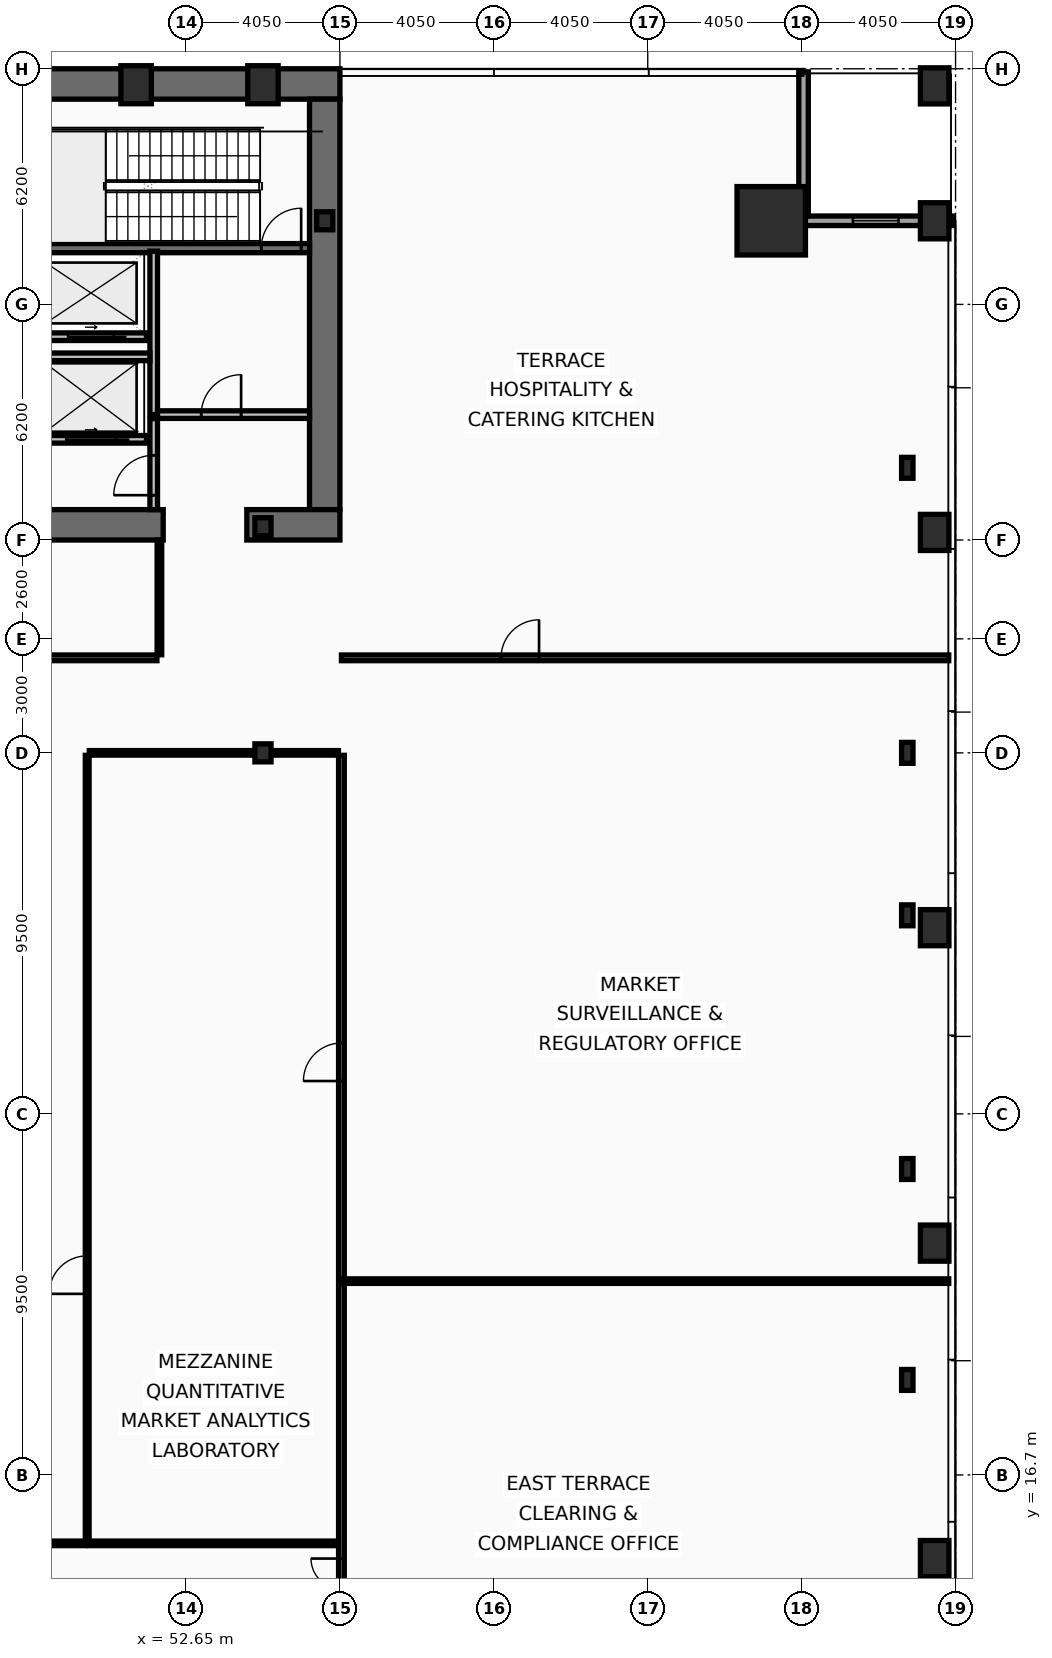
"""IFC4 building model, lengths in metres.
Left out: names, types, materials, properties, quantities, classifications, styles, units other than length and angle.
Written with IfcOpenShell. Run it as: python <this file> out.ifc"""

import sys

from ifc_helpers import new_model, si_unit, direction, frame, frame_2d, origin, origin_2d, place, context, subcontext, project, spatial, rectangle, hollow_rectangle, i_section, extrude, element, fill, save


model = new_model("IFC4")
c1 = context("Model", 3, precision=1e-05, world=origin(), true_north=direction((0.0, 1.0)))
c2 = subcontext(c1, "Body", "Model", "MODEL_VIEW")
j1 = project(units=[si_unit("LENGTHUNIT", "METRE"), si_unit("PLANEANGLEUNIT", "RADIAN")], contexts=[c1])
p1 = place(None, origin())
s1 = spatial("IfcSite", under=j1, at=p1, CompositionType="ELEMENT")
p2 = place(p1, origin())
s2 = spatial("IfcBuilding", under=s1, at=p2, CompositionType="ELEMENT")
p3 = place(p2, frame((0.0, 0.0, 15.4)))
s3 = spatial("IfcBuildingStorey", under=s2, at=p3, CompositionType="ELEMENT", Elevation=15.4)
p4 = place(p3, frame((16.2, 53.3, 0.0), z_axis=(0.0, 0.0, 1.0), x_axis=(1.0, 0.0, 0.0)))
e1 = element("IfcWall", 1, at=p4, inside=s3, PredefinedType="SHEAR", context=c2, shape_type="SweptSolid", body=[
    extrude(rectangle(XDim=40.5, YDim=0.8, at=frame_2d((20.25, 0.0))), origin(), (0.0, 0.0, 1.0), 4.78),
])
p5 = place(p3, frame((56.3, 52.9, 0.0), z_axis=(0.0, 0.0, 1.0), x_axis=(0.0, -1.0, 0.0)))
e2 = element("IfcWall", 2, at=p5, inside=s3, PredefinedType="SHEAR", context=c2, shape_type="SweptSolid", body=[
    extrude(rectangle(XDim=10.8, YDim=0.8, at=frame_2d((5.4, 0.0))), origin(), (0.0, 0.0, 1.0), 4.78),
])
p6 = place(p3, frame((52.05, 41.7, 0.0), z_axis=(0.0, 0.0, 1.0), x_axis=(-1.0, 0.0, 0.0)))
e3 = element("IfcWall", 3, at=p6, inside=s3, PredefinedType="SHEAR", context=c2, shape_type="SweptSolid", body=[
    extrude(rectangle(XDim=11.3, YDim=0.8, at=frame_2d((5.65, 0.0))), origin(), (0.0, 0.0, 1.0), 4.78),
])
p7 = place(p3, frame((56.7, 41.7, 0.0), z_axis=(0.0, 0.0, 1.0), x_axis=(-1.0, 0.0, 0.0)))
e4 = element("IfcWall", 4, at=p7, inside=s3, PredefinedType="SHEAR", context=c2, shape_type="SweptSolid", body=[
    extrude(rectangle(XDim=2.45, YDim=0.8, at=frame_2d((1.225, 0.0))), origin(), (0.0, 0.0, 1.0), 4.78),
])
p8 = place(p3, frame((48.63, 48.98, 0.0), z_axis=(0.0, 0.0, 1.0), x_axis=(1.0, 0.0, 0.0)))
e5 = element("IfcWall", 5, at=p8, inside=s3, PredefinedType="SHEAR", context=c2, shape_type="SweptSolid", body=[
    extrude(rectangle(XDim=7.27, YDim=0.24, at=frame_2d((3.635, 0.0))), origin(), (0.0, 0.0, 1.0), 4.78),
])
p9 = place(p8, frame((6.0, 0.0, 0.0)))
e6 = element("IfcOpeningElement", 6, at=p9, cuts=e5, PredefinedType="OPENING", context=c2, shape_type="SweptSolid", body=[
    extrude(rectangle(XDim=1.05, YDim=2.15, at=frame_2d((0.525, 1.075))), frame((0.0, 0.13, 0.0), z_axis=(0.0, -1.0, 0.0), x_axis=(1.0, 0.0, 0.0)), (0.0, 0.0, 1.0), 0.26),
])
p10 = place(p3, frame((68.05, 49.7, 0.0), z_axis=(0.0, 0.0, 1.0), x_axis=(1.0, 0.0, 0.0)))
e7 = element("IfcColumn", 7, at=p10, inside=s3, PredefinedType="COLUMN", context=c2, shape_type="SweptSolid", body=[
    extrude(hollow_rectangle(XDim=1.8, YDim=1.8, WallThickness=0.08, at=origin_2d()), origin(), (0.0, 0.0, 1.0), 5.0),
])
for number, where, z_axis, x_axis in (
    (8, (51.337, 53.28, 0.0), (0.0, 0.0, 1.0), (1.0, 0.0, 0.0)),
    (9, (54.675, 53.28, 0.0), (0.0, 0.0, 1.0), (1.0, 0.0, 0.0)),
):
    element("IfcColumn", number, at=place(p3, frame(where, z_axis=z_axis, x_axis=x_axis)), inside=s3, PredefinedType="COLUMN", context=c2, shape_type="SweptSolid", body=[
        extrude(hollow_rectangle(XDim=0.8, YDim=1.0, WallThickness=0.055, at=origin_2d()), origin(), (0.0, 0.0, 1.0), 5.0),
    ])
for number, where, z_axis, x_axis in (
    (10, (71.63, 19.2, 0.0), (0.0, 0.0, 1.0), (1.0, 0.0, 0.0)),
    (11, (71.63, 24.75, 0.0), (0.0, 0.0, 1.0), (1.0, 0.0, 0.0)),
    (12, (71.63, 31.425, 0.0), (0.0, 0.0, 1.0), (1.0, 0.0, 0.0)),
    (13, (71.63, 35.7, 0.0), (0.0, 0.0, 1.0), (1.0, 0.0, 0.0)),
    (14, (71.63, 43.2, 0.0), (0.0, 0.0, 1.0), (1.0, 0.0, 0.0)),
):
    element("IfcColumn", number, at=place(p3, frame(where, z_axis=z_axis, x_axis=x_axis)), inside=s3, PredefinedType="COLUMN", context=c2, shape_type="SweptSolid", body=[
        extrude(i_section(OverallWidth=0.3, OverallDepth=0.55, WebThickness=0.015, FlangeThickness=0.029, at=origin_2d()), origin(), (0.0, 0.0, 1.0), 5.0),
    ])
for number, where, z_axis, x_axis in (
    (15, (56.3, 49.7, 0.0), (0.0, 0.0, 1.0), (1.0, 0.0, 0.0)),
    (16, (54.675, 35.7, 0.0), (0.0, 0.0, 1.0), (1.0, 0.0, 0.0)),
    (17, (54.675, 41.65, 0.0), (0.0, 0.0, 1.0), (1.0, 0.0, 0.0)),
):
    element("IfcColumn", number, at=place(p3, frame(where, z_axis=z_axis, x_axis=x_axis)), inside=s3, PredefinedType="COLUMN", context=c2, shape_type="SweptSolid", body=[
        extrude(i_section(OverallWidth=0.424, OverallDepth=0.474, WebThickness=0.048, FlangeThickness=0.077, at=origin_2d()), origin(), (0.0, 0.0, 1.0), 5.0),
    ])
for number, where, z_axis, x_axis in (
    (18, (72.35, 49.7, 0.0), (0.0, 0.0, 1.0), (1.0, 0.0, 0.0)),
    (19, (72.35, 53.25, 0.0), (0.0, 0.0, 1.0), (1.0, 0.0, 0.0)),
    (20, (72.35, 14.5, 0.0), (0.0, 0.0, 1.0), (1.0, 0.0, 0.0)),
    (21, (72.35, 22.8, 0.0), (0.0, 0.0, 1.0), (1.0, 0.0, 0.0)),
    (22, (72.35, 31.1, 0.0), (0.0, 0.0, 1.0), (1.0, 0.0, 0.0)),
    (23, (72.35, 41.5, 0.0), (0.0, 0.0, 1.0), (1.0, 0.0, 0.0)),
):
    element("IfcColumn", number, at=place(p3, frame(where, z_axis=z_axis, x_axis=x_axis)), inside=s3, PredefinedType="PILASTER", context=c2, shape_type="SweptSolid", body=[
        extrude(rectangle(XDim=0.75, YDim=0.95, at=origin_2d()), origin(), (0.0, 0.0, 1.0), 5.0),
    ])
p11 = place(p3, frame((68.775, 49.7, 0.0), z_axis=(0.0, 0.0, 1.0), x_axis=(1.0, 0.0, 0.0)))
e24 = element("IfcWall", 24, at=p11, inside=s3, PredefinedType="SOLIDWALL", context=c2, shape_type="SweptSolid", body=[
    extrude(rectangle(XDim=4.045, YDim=0.25, at=frame_2d((2.022, 0.0))), origin(), (0.0, 0.0, 1.0), 4.12),
])
p12 = place(p11, frame((1.423, 0.0, 0.9)))
e25 = element("IfcOpeningElement", 25, at=p12, cuts=e24, PredefinedType="OPENING", context=c2, shape_type="SweptSolid", body=[
    extrude(rectangle(XDim=1.2, YDim=2.8, at=frame_2d((0.6, 1.4))), frame((0.0, 0.135, 0.0), z_axis=(0.0, -1.0, 0.0), x_axis=(1.0, 0.0, 0.0)), (0.0, 0.0, 1.0), 0.27),
])
p13 = place(p3, frame((68.9, 53.62, 0.0), z_axis=(0.0, 0.0, 1.0), x_axis=(0.0, -1.0, 0.0)))
e26 = element("IfcWall", 26, at=p13, inside=s3, PredefinedType="SOLIDWALL", context=c2, shape_type="SweptSolid", body=[
    extrude(rectangle(XDim=3.795, YDim=0.25, at=frame_2d((1.897, 0.0))), origin(), (0.0, 0.0, 1.0), 4.12),
])
p14 = place(p3, frame((51.61, 43.95, 0.0), z_axis=(0.0, 0.0, 1.0), x_axis=(-1.0, 0.0, 0.0)))
e27 = element("IfcWall", 27, at=p14, inside=s3, PredefinedType="PARTITIONING", context=c2, shape_type="SweptSolid", body=[
    extrude(rectangle(XDim=2.92, YDim=0.2, at=frame_2d((1.46, 0.0))), origin(), (0.0, 0.0, 1.0), 4.78),
])
p15 = place(p14, frame((0.81, 0.0, 0.0)))
e28 = element("IfcOpeningElement", 28, at=p15, cuts=e27, PredefinedType="OPENING", context=c2, shape_type="SweptSolid", body=[
    extrude(rectangle(XDim=1.3, YDim=2.18, at=frame_2d((0.65, 1.09))), frame((0.0, 0.11, 0.0), z_axis=(0.0, -1.0, 0.0), x_axis=(1.0, 0.0, 0.0)), (0.0, 0.0, 1.0), 0.22),
])
p16 = place(p3, frame((51.61, 46.65, 0.0), z_axis=(0.0, 0.0, 1.0), x_axis=(-1.0, 0.0, 0.0)))
e29 = element("IfcWall", 29, at=p16, inside=s3, PredefinedType="PARTITIONING", context=c2, shape_type="SweptSolid", body=[
    extrude(rectangle(XDim=2.92, YDim=0.2, at=frame_2d((1.46, 0.0))), origin(), (0.0, 0.0, 1.0), 4.78),
])
p17 = place(p16, frame((0.86, 0.0, 0.0)))
e30 = element("IfcOpeningElement", 30, at=p17, cuts=e29, PredefinedType="OPENING", context=c2, shape_type="SweptSolid", body=[
    extrude(rectangle(XDim=1.2, YDim=2.18, at=frame_2d((0.6, 1.09))), frame((0.0, 0.11, 0.0), z_axis=(0.0, -1.0, 0.0), x_axis=(1.0, 0.0, 0.0)), (0.0, 0.0, 1.0), 0.22),
])
p18 = place(p3, frame((51.8, 44.6, 0.0), z_axis=(0.0, 0.0, 1.0), x_axis=(0.0, 1.0, 0.0)))
e31 = element("IfcWall", 31, at=p18, inside=s3, PredefinedType="PARTITIONING", context=c2, shape_type="SweptSolid", body=[
    extrude(rectangle(XDim=4.3, YDim=0.2, at=frame_2d((2.15, 0.0))), origin(), (0.0, 0.0, 1.0), 4.78),
])
p19 = place(p3, frame((51.9, 44.6, 0.0), z_axis=(0.0, 0.0, 1.0), x_axis=(1.0, 0.0, 0.0)))
e32 = element("IfcWall", 32, at=p19, inside=s3, PredefinedType="PARTITIONING", context=c2, shape_type="SweptSolid", body=[
    extrude(rectangle(XDim=4.0, YDim=0.2, at=frame_2d((2.0, 0.0))), origin(), (0.0, 0.0, 1.0), 4.78),
])
p20 = place(p19, frame((1.15, 0.0, 0.0)))
e33 = element("IfcOpeningElement", 33, at=p20, cuts=e32, PredefinedType="OPENING", context=c2, shape_type="SweptSolid", body=[
    extrude(rectangle(XDim=1.05, YDim=2.15, at=frame_2d((0.525, 1.075))), frame((0.0, 0.11, 0.0), z_axis=(0.0, -1.0, 0.0), x_axis=(1.0, 0.0, 0.0)), (0.0, 0.0, 1.0), 0.22),
])
p21 = place(p3, frame((48.63, 46.12, 0.0), z_axis=(0.0, 0.0, 1.0), x_axis=(1.0, 0.0, 0.0)))
e34 = element("IfcWall", 34, at=p21, inside=s3, PredefinedType="PARTITIONING", context=c2, shape_type="SweptSolid", body=[
    extrude(rectangle(XDim=3.07, YDim=0.2, at=frame_2d((1.535, 0.0))), origin(), (0.0, 0.0, 1.0), 4.78),
])
p22 = place(p3, frame((51.8, 42.1, 0.0), z_axis=(0.0, 0.0, 1.0), x_axis=(0.0, 1.0, 0.0)))
e35 = element("IfcWall", 35, at=p22, inside=s3, PredefinedType="PARTITIONING", context=c2, shape_type="SweptSolid", body=[
    extrude(rectangle(XDim=2.395, YDim=0.2, at=frame_2d((1.198, 0.0))), origin(), (0.0, 0.0, 1.0), 4.78),
])
p23 = place(p22, frame((0.38, 0.0, 0.0)))
e36 = element("IfcOpeningElement", 36, at=p23, cuts=e35, PredefinedType="OPENING", context=c2, shape_type="SweptSolid", body=[
    extrude(rectangle(XDim=1.05, YDim=2.15, at=frame_2d((0.525, 1.075))), frame((0.0, 0.11, 0.0), z_axis=(0.0, -1.0, 0.0), x_axis=(1.0, 0.0, 0.0)), (0.0, 0.0, 1.0), 0.22),
])
p24 = place(p3, frame((56.74, 7.45, 0.0), z_axis=(0.0, 0.0, 1.0), x_axis=(0.0, 1.0, 0.0)))
e37 = element("IfcWall", 37, at=p24, inside=s3, PredefinedType="PARTITIONING", context=c2, shape_type="SweptSolid", body=[
    extrude(rectangle(XDim=14.285, YDim=0.15, at=frame_2d((7.143, 0.0))), origin(), (0.0, 0.0, 1.0), 3.87),
])
p25 = place(p24, frame((5.45, 0.0, 0.0)))
e38 = element("IfcOpeningElement", 38, at=p25, cuts=e37, PredefinedType="OPENING", context=c2, shape_type="SweptSolid", body=[
    extrude(rectangle(XDim=1.6, YDim=2.15, at=frame_2d((0.8, 1.075))), frame((0.0, 0.085, 0.0), z_axis=(0.0, -1.0, 0.0), x_axis=(1.0, 0.0, 0.0)), (0.0, 0.0, 1.0), 0.17),
])
p26 = place(p3, frame((56.74, 21.865, 0.0), z_axis=(0.0, 0.0, 1.0), x_axis=(0.0, 1.0, 0.0)))
e39 = element("IfcWall", 39, at=p26, inside=s3, PredefinedType="PARTITIONING", context=c2, shape_type="SweptSolid", body=[
    extrude(rectangle(XDim=13.77, YDim=0.15, at=frame_2d((6.885, 0.0))), origin(), (0.0, 0.0, 1.0), 3.87),
])
p27 = place(p26, frame((5.2, 0.0, 0.0)))
e40 = element("IfcOpeningElement", 40, at=p27, cuts=e39, PredefinedType="OPENING", context=c2, shape_type="SweptSolid", body=[
    extrude(rectangle(XDim=1.0, YDim=2.05, at=frame_2d((0.5, 1.025))), frame((0.0, 0.085, 0.0), z_axis=(0.0, -1.0, 0.0), x_axis=(1.0, 0.0, 0.0)), (0.0, 0.0, 1.0), 0.17),
])
p28 = place(p3, frame((56.82, 21.8, 0.0), z_axis=(0.0, 0.0, 1.0), x_axis=(1.0, 0.0, 0.0)))
e41 = element("IfcWall", 41, at=p28, inside=s3, PredefinedType="PARTITIONING", context=c2, shape_type="SweptSolid", body=[
    extrude(rectangle(XDim=15.9, YDim=0.12, at=frame_2d((7.95, 0.0))), origin(), (0.0, 0.0, 1.0), 4.12),
])
p29 = place(p3, frame((56.74, 38.2, 0.0), z_axis=(0.0, 0.0, 1.0), x_axis=(1.0, 0.0, 0.0)))
e42 = element("IfcWall", 42, at=p29, inside=s3, PredefinedType="PARTITIONING", context=c2, shape_type="SweptSolid", body=[
    extrude(rectangle(XDim=15.98, YDim=0.15, at=frame_2d((7.99, 0.0))), origin(), (0.0, 0.0, 1.0), 4.12),
])
p30 = place(p29, frame((4.2, 0.0, 0.0)))
e43 = element("IfcOpeningElement", 43, at=p30, cuts=e42, PredefinedType="OPENING", context=c2, shape_type="SweptSolid", body=[
    extrude(rectangle(XDim=1.0, YDim=2.05, at=frame_2d((0.5, 1.025))), frame((0.0, 0.085, 0.0), z_axis=(0.0, -1.0, 0.0), x_axis=(1.0, 0.0, 0.0)), (0.0, 0.0, 1.0), 0.17),
])
p31 = place(p3, frame((51.95, 38.28, 0.0), z_axis=(0.0, 0.0, 1.0), x_axis=(0.0, 1.0, 0.0)))
e44 = element("IfcWall", 44, at=p31, inside=s3, PredefinedType="PARTITIONING", context=c2, shape_type="SweptSolid", body=[
    extrude(rectangle(XDim=3.02, YDim=0.12, at=frame_2d((1.51, 0.0))), origin(), (0.0, 0.0, 1.0), 4.78),
])
p32 = place(p3, frame((40.915, 38.2, 0.0), z_axis=(0.0, 0.0, 1.0), x_axis=(1.0, 0.0, 0.0)))
e45 = element("IfcWall", 45, at=p32, inside=s3, PredefinedType="PARTITIONING", context=c2, shape_type="SweptSolid", body=[
    extrude(rectangle(XDim=10.97, YDim=0.15, at=frame_2d((5.485, 0.0))), origin(), (0.0, 0.0, 1.0), 3.87),
])
p33 = place(p32, frame((3.5, 0.0, 0.0)))
e46 = element("IfcOpeningElement", 46, at=p33, cuts=e45, PredefinedType="OPENING", context=c2, shape_type="SweptSolid", body=[
    extrude(rectangle(XDim=0.9, YDim=2.05, at=frame_2d((0.45, 1.025))), frame((0.0, 0.085, 0.0), z_axis=(0.0, -1.0, 0.0), x_axis=(1.0, 0.0, 0.0)), (0.0, 0.0, 1.0), 0.17),
])
p34 = place(p3, frame((50.05, 14.965, 0.0), z_axis=(0.0, 0.0, 1.0), x_axis=(0.0, 1.0, 0.0)))
e47 = element("IfcWall", 47, at=p34, inside=s3, PredefinedType="MOVABLE", context=c2, shape_type="SweptSolid", body=[
    extrude(rectangle(XDim=20.67, YDim=0.1, at=frame_2d((10.335, 0.0))), origin(), (0.0, 0.0, 1.0), 4.17),
])
p35 = place(p34, frame((6.5, 0.0, 0.0)))
e48 = element("IfcOpeningElement", 48, at=p35, cuts=e47, PredefinedType="OPENING", context=c2, shape_type="SweptSolid", body=[
    extrude(rectangle(XDim=1.0, YDim=2.05, at=frame_2d((0.5, 1.025))), frame((0.0, 0.06, 0.0), z_axis=(0.0, -1.0, 0.0), x_axis=(1.0, 0.0, 0.0)), (0.0, 0.0, 1.0), 0.12),
])
for number, where, z_axis, x_axis in (
    (49, (50.105, 14.9, 0.0), (0.0, 0.0, 1.0), (1.0, 0.0, 0.0)),
    (50, (50.105, 35.7, 0.0), (0.0, 0.0, 1.0), (1.0, 0.0, 0.0)),
):
    element("IfcWall", number, at=place(p3, frame(where, z_axis=z_axis, x_axis=x_axis)), inside=s3, PredefinedType="PARTITIONING", context=c2, shape_type="SweptSolid", body=[
        extrude(rectangle(XDim=6.555, YDim=0.12, at=frame_2d((3.277, 0.0))), origin(), (0.0, 0.0, 1.0), 3.87),
    ])
p36 = place(p3, frame((22.905, 14.9, 0.0), z_axis=(0.0, 0.0, 1.0), x_axis=(1.0, 0.0, 0.0)))
e51 = element("IfcWall", 51, at=p36, inside=s3, PredefinedType="PARTITIONING", context=c2, shape_type="SweptSolid", body=[
    extrude(rectangle(XDim=27.09, YDim=0.12, at=frame_2d((13.545, 0.0))), origin(), (0.0, 0.0, 1.0), 3.87),
])
p37 = place(p12, origin())
e52 = element("IfcWindow", 52, at=p37, inside=s3, PartitioningType="SINGLE_PANEL", PredefinedType="WINDOW", context=c2, shape_type="SweptSolid", body=[
    extrude(rectangle(XDim=1.2, YDim=2.8, at=frame_2d((0.6, 1.4))), frame((0.0, 0.03, 0.0), z_axis=(0.0, -1.0, 0.0), x_axis=(1.0, 0.0, 0.0)), (0.0, 0.0, 1.0), 0.06),
])
fill(e25, e52)
p38 = place(p9, origin())
e53 = element("IfcDoor", 53, at=p38, inside=s3, OperationType="SINGLE_SWING_RIGHT", PredefinedType="DOOR", context=c2, shape_type="SweptSolid", body=[
    extrude(rectangle(XDim=1.05, YDim=2.15, at=frame_2d((0.525, 1.075))), frame((0.0, 0.025, 0.0), z_axis=(0.0, -1.0, 0.0), x_axis=(1.0, 0.0, 0.0)), (0.0, 0.0, 1.0), 0.05),
])
fill(e6, e53)
p39 = place(p15, origin())
e54 = element("IfcDoor", 54, at=p39, inside=s3, OperationType="SLIDING_TO_LEFT", PredefinedType="DOOR", context=c2, shape_type="SweptSolid", body=[
    extrude(rectangle(XDim=1.3, YDim=2.18, at=frame_2d((0.65, 1.09))), frame((0.0, 0.025, 0.0), z_axis=(0.0, -1.0, 0.0), x_axis=(1.0, 0.0, 0.0)), (0.0, 0.0, 1.0), 0.05),
])
fill(e28, e54)
p40 = place(p17, origin())
e55 = element("IfcDoor", 55, at=p40, inside=s3, OperationType="SLIDING_TO_LEFT", PredefinedType="DOOR", context=c2, shape_type="SweptSolid", body=[
    extrude(rectangle(XDim=1.2, YDim=2.18, at=frame_2d((0.6, 1.09))), frame((0.0, 0.025, 0.0), z_axis=(0.0, -1.0, 0.0), x_axis=(1.0, 0.0, 0.0)), (0.0, 0.0, 1.0), 0.05),
])
fill(e30, e55)
p41 = place(p20, origin())
e56 = element("IfcDoor", 56, at=p41, inside=s3, OperationType="SINGLE_SWING_RIGHT", PredefinedType="DOOR", context=c2, shape_type="SweptSolid", body=[
    extrude(rectangle(XDim=1.05, YDim=2.15, at=frame_2d((0.525, 1.075))), frame((0.0, 0.025, 0.0), z_axis=(0.0, -1.0, 0.0), x_axis=(1.0, 0.0, 0.0)), (0.0, 0.0, 1.0), 0.05),
])
fill(e33, e56)
p42 = place(p23, origin())
e57 = element("IfcDoor", 57, at=p42, inside=s3, OperationType="SINGLE_SWING_LEFT", PredefinedType="DOOR", context=c2, shape_type="SweptSolid", body=[
    extrude(rectangle(XDim=1.05, YDim=2.15, at=frame_2d((0.525, 1.075))), frame((0.0, 0.025, 0.0), z_axis=(0.0, -1.0, 0.0), x_axis=(1.0, 0.0, 0.0)), (0.0, 0.0, 1.0), 0.05),
])
fill(e36, e57)
p43 = place(p25, origin())
e58 = element("IfcDoor", 58, at=p43, inside=s3, OperationType="DOUBLE_DOOR_SINGLE_SWING", PredefinedType="DOOR", context=c2, shape_type="SweptSolid", body=[
    extrude(rectangle(XDim=1.6, YDim=2.15, at=frame_2d((0.8, 1.075))), frame((0.0, 0.025, 0.0), z_axis=(0.0, -1.0, 0.0), x_axis=(1.0, 0.0, 0.0)), (0.0, 0.0, 1.0), 0.05),
])
fill(e38, e58)
p44 = place(p27, origin())
e59 = element("IfcDoor", 59, at=p44, inside=s3, OperationType="SINGLE_SWING_LEFT", PredefinedType="DOOR", context=c2, shape_type="SweptSolid", body=[
    extrude(rectangle(XDim=1.0, YDim=2.05, at=frame_2d((0.5, 1.025))), frame((0.0, 0.025, 0.0), z_axis=(0.0, -1.0, 0.0), x_axis=(1.0, 0.0, 0.0)), (0.0, 0.0, 1.0), 0.05),
])
fill(e40, e59)
p45 = place(p30, origin())
e60 = element("IfcDoor", 60, at=p45, inside=s3, OperationType="SINGLE_SWING_RIGHT", PredefinedType="DOOR", context=c2, shape_type="SweptSolid", body=[
    extrude(rectangle(XDim=1.0, YDim=2.05, at=frame_2d((0.5, 1.025))), frame((0.0, 0.025, 0.0), z_axis=(0.0, -1.0, 0.0), x_axis=(1.0, 0.0, 0.0)), (0.0, 0.0, 1.0), 0.05),
])
fill(e43, e60)
p46 = place(p35, origin())
e61 = element("IfcDoor", 61, at=p46, inside=s3, OperationType="SINGLE_SWING_LEFT", PredefinedType="DOOR", context=c2, shape_type="SweptSolid", body=[
    extrude(rectangle(XDim=1.0, YDim=2.05, at=frame_2d((0.5, 1.025))), frame((0.0, 0.025, 0.0), z_axis=(0.0, -1.0, 0.0), x_axis=(1.0, 0.0, 0.0)), (0.0, 0.0, 1.0), 0.05),
])
fill(e48, e61)
save(model, sys.argv[1])
